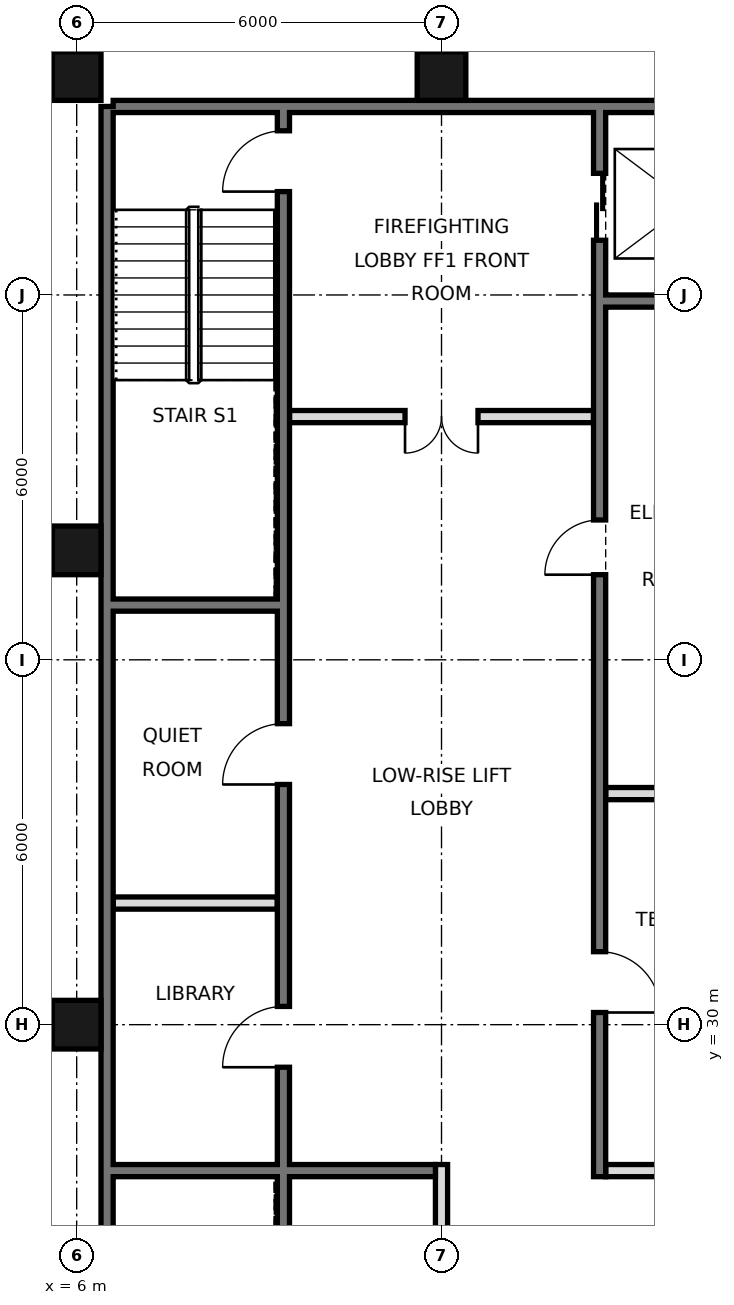
"""IFC4 building model, lengths in metres.
Left out: names, types, materials, properties, quantities, classifications, styles, units other than length and angle.
Written with IfcOpenShell. Run it as: python <this file> out.ifc"""

import sys

from ifc_helpers import new_model, si_unit, direction, frame, frame_2d, origin, origin_2d, place, context, subcontext, project, spatial, rectangle, hollow_rectangle, extrude, element, fill, save


model = new_model("IFC4")
c1 = context("Model", 3, precision=1e-05, world=origin(), true_north=direction((0.0, 1.0)))
c2 = subcontext(c1, "Body", "Model", "MODEL_VIEW")
j1 = project(units=[si_unit("LENGTHUNIT", "METRE"), si_unit("PLANEANGLEUNIT", "RADIAN")], contexts=[c1])
p1 = place(None, origin())
s1 = spatial("IfcSite", under=j1, at=p1, CompositionType="ELEMENT")
p2 = place(p1, origin())
s2 = spatial("IfcBuilding", under=s1, at=p2, CompositionType="ELEMENT")
p3 = place(p2, frame((0.0, 0.0, 226.2)))
s3 = spatial("IfcBuildingStorey", under=s2, at=p3, CompositionType="ELEMENT", Elevation=226.2)
for number, where, z_axis, x_axis in (
    (1, (6.0, 30.0, 0.0), (0.0, 0.0, 1.0), (1.0, 0.0, 0.0)),
    (2, (6.0, 37.8, 0.0), (0.0, 0.0, 1.0), (1.0, 0.0, 0.0)),
    (3, (6.0, 45.6, 0.0), (0.0, 0.0, 1.0), (1.0, 0.0, 0.0)),
    (4, (12.0, 45.6, 0.0), (0.0, 0.0, 1.0), (1.0, 0.0, 0.0)),
):
    element("IfcColumn", number, at=place(p3, frame(where, z_axis=z_axis, x_axis=x_axis)), inside=s3, PredefinedType="COLUMN", context=c2, shape_type="SweptSolid", body=[
        extrude(hollow_rectangle(XDim=0.8, YDim=0.8, WallThickness=0.04, at=origin_2d()), origin(), (0.0, 0.0, 1.0), 3.6),
    ])
p4 = place(p3, frame((6.5, 21.6, 0.0), z_axis=(0.0, 0.0, 1.0), x_axis=(0.0, 1.0, 0.0)))
e5 = element("IfcWall", 5, at=p4, inside=s3, PredefinedType="SOLIDWALL", context=c2, shape_type="SweptSolid", body=[
    extrude(rectangle(XDim=23.5, YDim=0.2, at=frame_2d((11.75, 0.0))), origin(), (0.0, 0.0, 1.0), 3.42),
])
p5 = place(p3, frame((6.6, 45.1, 0.0), z_axis=(0.0, 0.0, 1.0), x_axis=(1.0, 0.0, 0.0)))
e6 = element("IfcWall", 6, at=p5, inside=s3, PredefinedType="SOLIDWALL", context=c2, shape_type="SweptSolid", body=[
    extrude(rectangle(XDim=34.8, YDim=0.2, at=frame_2d((17.4, 0.0))), origin(), (0.0, 0.0, 1.0), 3.42),
])
p6 = place(p3, frame((12.0, 21.6, 0.0), z_axis=(0.0, 0.0, 1.0), x_axis=(0.0, 1.0, 0.0)))
e7 = element("IfcWall", 7, at=p6, inside=s3, PredefinedType="PARTITIONING", context=c2, shape_type="SweptSolid", body=[
    extrude(rectangle(XDim=6.1, YDim=0.2, at=frame_2d((3.05, 0.0))), origin(), (0.0, 0.0, 1.0), 3.42),
])
p7 = place(p3, frame((14.6, 27.5, 0.0), z_axis=(0.0, 0.0, 1.0), x_axis=(0.0, 1.0, 0.0)))
e8 = element("IfcWall", 8, at=p7, inside=s3, PredefinedType="SOLIDWALL", context=c2, shape_type="SweptSolid", body=[
    extrude(rectangle(XDim=17.5, YDim=0.2, at=frame_2d((8.75, 0.0))), origin(), (0.0, 0.0, 1.0), 3.42),
])
p8 = place(p7, frame((15.4, 0.0, 0.0)))
e9 = element("IfcOpeningElement", 9, at=p8, cuts=e8, PredefinedType="OPENING", context=c2, shape_type="SweptSolid", body=[
    extrude(rectangle(XDim=1.1, YDim=2.1, at=frame_2d((0.55, 1.05))), frame((0.0, 0.11, 0.0), z_axis=(0.0, -1.0, 0.0), x_axis=(1.0, 0.0, 0.0)), (0.0, 0.0, 1.0), 0.22),
])
p9 = place(p7, frame((2.7, 0.0, 0.0)))
e10 = element("IfcOpeningElement", 10, at=p9, cuts=e8, PredefinedType="OPENING", context=c2, shape_type="SweptSolid", body=[
    extrude(rectangle(XDim=1.0, YDim=2.1, at=frame_2d((0.5, 1.05))), frame((0.0, 0.11, 0.0), z_axis=(0.0, -1.0, 0.0), x_axis=(1.0, 0.0, 0.0)), (0.0, 0.0, 1.0), 0.22),
])
p10 = place(p7, frame((9.9, 0.0, 0.0)))
e11 = element("IfcOpeningElement", 11, at=p10, cuts=e8, PredefinedType="OPENING", context=c2, shape_type="SweptSolid", body=[
    extrude(rectangle(XDim=0.9, YDim=2.1, at=frame_2d((0.45, 1.05))), frame((0.0, 0.11, 0.0), z_axis=(0.0, -1.0, 0.0), x_axis=(1.0, 0.0, 0.0)), (0.0, 0.0, 1.0), 0.22),
])
p11 = place(p3, frame((9.4, 21.6, 0.0), z_axis=(0.0, 0.0, 1.0), x_axis=(0.0, 1.0, 0.0)))
e12 = element("IfcWall", 12, at=p11, inside=s3, PredefinedType="SOLIDWALL", context=c2, shape_type="SweptSolid", body=[
    extrude(rectangle(XDim=23.4, YDim=0.2, at=frame_2d((11.7, 0.0))), origin(), (0.0, 0.0, 1.0), 3.42),
])
p12 = place(p11, frame((7.7, 0.0, 0.0)))
e13 = element("IfcOpeningElement", 13, at=p12, cuts=e12, PredefinedType="OPENING", context=c2, shape_type="SweptSolid", body=[
    extrude(rectangle(XDim=1.0, YDim=2.1, at=frame_2d((0.5, 1.05))), frame((0.0, 0.11, 0.0), z_axis=(0.0, -1.0, 0.0), x_axis=(1.0, 0.0, 0.0)), (0.0, 0.0, 1.0), 0.22),
])
p13 = place(p11, frame((12.35, 0.0, 0.0)))
e14 = element("IfcOpeningElement", 14, at=p13, cuts=e12, PredefinedType="OPENING", context=c2, shape_type="SweptSolid", body=[
    extrude(rectangle(XDim=1.0, YDim=2.1, at=frame_2d((0.5, 1.05))), frame((0.0, 0.11, 0.0), z_axis=(0.0, -1.0, 0.0), x_axis=(1.0, 0.0, 0.0)), (0.0, 0.0, 1.0), 0.22),
])
p14 = place(p11, frame((22.1, 0.0, 0.0)))
e15 = element("IfcOpeningElement", 15, at=p14, cuts=e12, PredefinedType="OPENING", context=c2, shape_type="SweptSolid", body=[
    extrude(rectangle(XDim=1.0, YDim=2.1, at=frame_2d((0.5, 1.05))), frame((0.0, 0.11, 0.0), z_axis=(0.0, -1.0, 0.0), x_axis=(1.0, 0.0, 0.0)), (0.0, 0.0, 1.0), 0.22),
])
p15 = place(p11, frame((0.175, 0.0, 0.0)))
e16 = element("IfcOpeningElement", 16, at=p15, cuts=e12, PredefinedType="OPENING", context=c2, shape_type="SweptSolid", body=[
    extrude(rectangle(XDim=0.9, YDim=2.1, at=frame_2d((0.45, 1.05))), frame((0.0, 0.11, 0.0), z_axis=(0.0, -1.0, 0.0), x_axis=(1.0, 0.0, 0.0)), (0.0, 0.0, 1.0), 0.22),
])
p16 = place(p3, frame((14.7, 27.6, 0.0), z_axis=(0.0, 0.0, 1.0), x_axis=(1.0, 0.0, 0.0)))
e17 = element("IfcWall", 17, at=p16, inside=s3, PredefinedType="PARTITIONING", context=c2, shape_type="SweptSolid", body=[
    extrude(rectangle(XDim=2.7, YDim=0.2, at=frame_2d((1.35, 0.0))), origin(), (0.0, 0.0, 1.0), 3.42),
])
p17 = place(p3, frame((6.6, 27.6, 0.0), z_axis=(0.0, 0.0, 1.0), x_axis=(1.0, 0.0, 0.0)))
e18 = element("IfcWall", 18, at=p17, inside=s3, PredefinedType="SOLIDWALL", context=c2, shape_type="SweptSolid", body=[
    extrude(rectangle(XDim=5.3, YDim=0.2, at=frame_2d((2.65, 0.0))), origin(), (0.0, 0.0, 1.0), 3.42),
])
p18 = place(p3, frame((6.6, 32.0, 0.0), z_axis=(0.0, 0.0, 1.0), x_axis=(1.0, 0.0, 0.0)))
e19 = element("IfcWall", 19, at=p18, inside=s3, PredefinedType="PARTITIONING", context=c2, shape_type="SweptSolid", body=[
    extrude(rectangle(XDim=2.7, YDim=0.2, at=frame_2d((1.35, 0.0))), origin(), (0.0, 0.0, 1.0), 3.42),
])
for number, where, z_axis, x_axis in (
    (20, (14.7, 33.8, 0.0), (0.0, 0.0, 1.0), (1.0, 0.0, 0.0)),
    (21, (6.6, 36.9, 0.0), (0.0, 0.0, 1.0), (1.0, 0.0, 0.0)),
):
    element("IfcWall", number, at=place(p3, frame(where, z_axis=z_axis, x_axis=x_axis)), inside=s3, PredefinedType="SOLIDWALL", context=c2, shape_type="SweptSolid", body=[
        extrude(rectangle(XDim=2.7, YDim=0.2, at=frame_2d((1.35, 0.0))), origin(), (0.0, 0.0, 1.0), 3.42),
    ])
p19 = place(p3, frame((9.5, 40.0, 0.0), z_axis=(0.0, 0.0, 1.0), x_axis=(1.0, 0.0, 0.0)))
e22 = element("IfcWall", 22, at=p19, inside=s3, PredefinedType="PARTITIONING", context=c2, shape_type="SweptSolid", body=[
    extrude(rectangle(XDim=5.0, YDim=0.2, at=frame_2d((2.5, 0.0))), origin(), (0.0, 0.0, 1.0), 3.42),
])
p20 = place(p19, frame((1.9, 0.0, 0.0)))
e23 = element("IfcOpeningElement", 23, at=p20, cuts=e22, PredefinedType="OPENING", context=c2, shape_type="SweptSolid", body=[
    extrude(rectangle(XDim=1.2, YDim=2.1, at=frame_2d((0.6, 1.05))), frame((0.0, 0.11, 0.0), z_axis=(0.0, -1.0, 0.0), x_axis=(1.0, 0.0, 0.0)), (0.0, 0.0, 1.0), 0.22),
])
p21 = place(p3, frame((14.7, 41.9, 0.0), z_axis=(0.0, 0.0, 1.0), x_axis=(1.0, 0.0, 0.0)))
e24 = element("IfcWall", 24, at=p21, inside=s3, PredefinedType="SOLIDWALL", context=c2, shape_type="SweptSolid", body=[
    extrude(rectangle(XDim=2.7, YDim=0.2, at=frame_2d((1.35, 0.0))), origin(), (0.0, 0.0, 1.0), 3.42),
])
p22 = place(p20, frame((1.2, 0.0, 0.0), z_axis=(0.0, 0.0, 1.0), x_axis=(-1.0, 0.0, 0.0)))
e25 = element("IfcDoor", 25, at=p22, inside=s3, OperationType="DOUBLE_DOOR_SINGLE_SWING", PredefinedType="DOOR", context=c2, shape_type="SweptSolid", body=[
    extrude(rectangle(XDim=1.2, YDim=2.1, at=frame_2d((0.6, 1.05))), frame((0.0, 0.025, 0.0), z_axis=(0.0, -1.0, 0.0), x_axis=(1.0, 0.0, 0.0)), (0.0, 0.0, 1.0), 0.05),
])
fill(e23, e25)
p23 = place(p8, origin())
e26 = element("IfcDoor", 26, at=p23, inside=s3, OperationType="DOUBLE_DOOR_SLIDING", PredefinedType="DOOR", context=c2, shape_type="SweptSolid", body=[
    extrude(rectangle(XDim=1.1, YDim=2.1, at=frame_2d((0.55, 1.05))), frame((0.0, 0.025, 0.0), z_axis=(0.0, -1.0, 0.0), x_axis=(1.0, 0.0, 0.0)), (0.0, 0.0, 1.0), 0.05),
])
fill(e9, e26)
p24 = place(p9, frame((1.0, 0.0, 0.0), z_axis=(0.0, 0.0, 1.0), x_axis=(-1.0, 0.0, 0.0)))
e27 = element("IfcDoor", 27, at=p24, inside=s3, OperationType="SINGLE_SWING_RIGHT", PredefinedType="DOOR", context=c2, shape_type="SweptSolid", body=[
    extrude(rectangle(XDim=1.0, YDim=2.1, at=frame_2d((0.5, 1.05))), frame((0.0, 0.025, 0.0), z_axis=(0.0, -1.0, 0.0), x_axis=(1.0, 0.0, 0.0)), (0.0, 0.0, 1.0), 0.05),
])
fill(e10, e27)
p25 = place(p12, origin())
e28 = element("IfcDoor", 28, at=p25, inside=s3, OperationType="SINGLE_SWING_LEFT", PredefinedType="DOOR", context=c2, shape_type="SweptSolid", body=[
    extrude(rectangle(XDim=1.0, YDim=2.1, at=frame_2d((0.5, 1.05))), frame((0.0, 0.025, 0.0), z_axis=(0.0, -1.0, 0.0), x_axis=(1.0, 0.0, 0.0)), (0.0, 0.0, 1.0), 0.05),
])
fill(e13, e28)
p26 = place(p13, origin())
e29 = element("IfcDoor", 29, at=p26, inside=s3, OperationType="SINGLE_SWING_LEFT", PredefinedType="DOOR", context=c2, shape_type="SweptSolid", body=[
    extrude(rectangle(XDim=1.0, YDim=2.1, at=frame_2d((0.5, 1.05))), frame((0.0, 0.025, 0.0), z_axis=(0.0, -1.0, 0.0), x_axis=(1.0, 0.0, 0.0)), (0.0, 0.0, 1.0), 0.05),
])
fill(e14, e29)
p27 = place(p14, origin())
e30 = element("IfcDoor", 30, at=p27, inside=s3, OperationType="SINGLE_SWING_LEFT", PredefinedType="DOOR", context=c2, shape_type="SweptSolid", body=[
    extrude(rectangle(XDim=1.0, YDim=2.1, at=frame_2d((0.5, 1.05))), frame((0.0, 0.025, 0.0), z_axis=(0.0, -1.0, 0.0), x_axis=(1.0, 0.0, 0.0)), (0.0, 0.0, 1.0), 0.05),
])
fill(e15, e30)
p28 = place(p10, origin())
e31 = element("IfcDoor", 31, at=p28, inside=s3, OperationType="SINGLE_SWING_LEFT", PredefinedType="DOOR", context=c2, shape_type="SweptSolid", body=[
    extrude(rectangle(XDim=0.9, YDim=2.1, at=frame_2d((0.45, 1.05))), frame((0.0, 0.025, 0.0), z_axis=(0.0, -1.0, 0.0), x_axis=(1.0, 0.0, 0.0)), (0.0, 0.0, 1.0), 0.05),
])
fill(e11, e31)
save(model, sys.argv[1])
